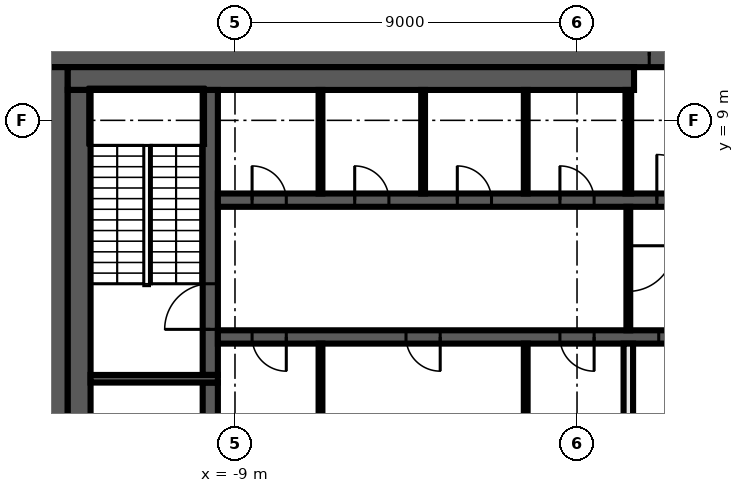
"""IFC4 building model, lengths in metres.
Left out: names, types, materials, properties, quantities, classifications, styles, units other than length and angle.
Written with IfcOpenShell. Run it as: python <this file> out.ifc"""

import sys

from ifc_helpers import new_model, si_unit, direction, frame, frame_2d, origin, place, context, subcontext, project, spatial, rectangle, extrude, element, fill, save


model = new_model("IFC4")
c1 = context("Model", 3, precision=1e-05, world=origin(), true_north=direction((0.0, 1.0)))
c2 = subcontext(c1, "Body", "Model", "MODEL_VIEW")
j1 = project(units=[si_unit("LENGTHUNIT", "METRE"), si_unit("PLANEANGLEUNIT", "RADIAN")], contexts=[c1])
p1 = place(None, origin())
s1 = spatial("IfcSite", under=j1, at=p1, CompositionType="ELEMENT")
p2 = place(p1, origin())
s2 = spatial("IfcBuilding", under=s1, at=p2, CompositionType="ELEMENT")
p3 = place(p2, frame((0.0, 0.0, 289.2)))
s3 = spatial("IfcBuildingStorey", under=s2, at=p3, CompositionType="ELEMENT", Elevation=289.2)
p4 = place(p3, frame((-14.0, 10.7, 0.0), z_axis=(0.0, 0.0, 1.0), x_axis=(1.0, 0.0, 0.0)))
e1 = element("IfcWall", 1, at=p4, inside=s3, PredefinedType="SHEAR", context=c2, shape_type="SweptSolid", body=[
    extrude(rectangle(XDim=28.0, YDim=0.6, at=frame_2d((14.0, 0.0))), origin(), (0.0, 0.0, 1.0), 4.62),
])
p5 = place(p4, frame((15.9, 0.0, 0.0)))
e2 = element("IfcOpeningElement", 2, at=p5, cuts=e1, PredefinedType="OPENING", context=c2, shape_type="SweptSolid", body=[
    extrude(rectangle(XDim=1.6, YDim=2.1, at=frame_2d((0.8, 1.05))), frame((0.0, 0.31, 0.0), z_axis=(0.0, -1.0, 0.0), x_axis=(1.0, 0.0, 0.0)), (0.0, 0.0, 1.0), 0.62),
])
p6 = place(p3, frame((-13.7, -10.4, 0.0), z_axis=(0.0, 0.0, 1.0), x_axis=(0.0, 1.0, 0.0)))
e3 = element("IfcWall", 3, at=p6, inside=s3, PredefinedType="SHEAR", context=c2, shape_type="SweptSolid", body=[
    extrude(rectangle(XDim=20.8, YDim=0.6, at=frame_2d((10.4, 0.0))), origin(), (0.0, 0.0, 1.0), 4.62),
])
p7 = place(p3, frame((-13.4, 10.1, 0.0), z_axis=(0.0, 0.0, 1.0), x_axis=(1.0, 0.0, 0.0)))
e4 = element("IfcWall", 4, at=p7, inside=s3, PredefinedType="SHEAR", context=c2, shape_type="SweptSolid", body=[
    extrude(rectangle(XDim=14.9, YDim=0.6, at=frame_2d((7.45, 0.0))), origin(), (0.0, 0.0, 1.0), 4.62),
])
p8 = place(p3, frame((-13.1, -9.8, 0.0), z_axis=(0.0, 0.0, 1.0), x_axis=(0.0, 1.0, 0.0)))
e5 = element("IfcWall", 5, at=p8, inside=s3, PredefinedType="SHEAR", context=c2, shape_type="SweptSolid", body=[
    extrude(rectangle(XDim=19.6, YDim=0.6, at=frame_2d((9.8, 0.0))), origin(), (0.0, 0.0, 1.0), 4.62),
])
p9 = place(p3, frame((-9.65, -2.1, 0.0), z_axis=(0.0, 0.0, 1.0), x_axis=(0.0, 1.0, 0.0)))
e6 = element("IfcWall", 6, at=p9, inside=s3, PredefinedType="SHEAR", context=c2, shape_type="SweptSolid", body=[
    extrude(rectangle(XDim=4.2, YDim=0.4, at=frame_2d((2.1, 0.0))), origin(), (0.0, 0.0, 1.0), 4.62),
])
p10 = place(p3, frame((-9.65, 2.3, 0.0), z_axis=(0.0, 0.0, 1.0), x_axis=(0.0, 1.0, 0.0)))
e7 = element("IfcWall", 7, at=p10, inside=s3, PredefinedType="SHEAR", context=c2, shape_type="SweptSolid", body=[
    extrude(rectangle(XDim=7.5, YDim=0.4, at=frame_2d((3.75, 0.0))), origin(), (0.0, 0.0, 1.0), 4.62),
])
p11 = place(p10, frame((1.2, 0.0, 0.0)))
e8 = element("IfcOpeningElement", 8, at=p11, cuts=e7, PredefinedType="OPENING", context=c2, shape_type="SweptSolid", body=[
    extrude(rectangle(XDim=1.2, YDim=2.1, at=frame_2d((0.6, 1.05))), frame((0.0, 0.21, 0.0), z_axis=(0.0, -1.0, 0.0), x_axis=(1.0, 0.0, 0.0)), (0.0, 0.0, 1.0), 0.42),
])
p12 = place(p3, frame((-9.45, 2.2, 0.0), z_axis=(0.0, 0.0, 1.0), x_axis=(-1.0, 0.0, 0.0)))
e9 = element("IfcWall", 9, at=p12, inside=s3, PredefinedType="SHEAR", context=c2, shape_type="SweptSolid", body=[
    extrude(rectangle(XDim=3.35, YDim=0.2, at=frame_2d((1.675, 0.0))), origin(), (0.0, 0.0, 1.0), 4.62),
])
p13 = place(p3, frame((-9.45, 6.9, 0.0), z_axis=(0.0, 0.0, 1.0), x_axis=(1.0, 0.0, 0.0)))
e10 = element("IfcWall", 10, at=p13, inside=s3, PredefinedType="SHEAR", context=c2, shape_type="SweptSolid", body=[
    extrude(rectangle(XDim=18.9, YDim=0.35, at=frame_2d((9.45, 0.0))), origin(), (0.0, 0.0, 1.0), 4.62),
])
p14 = place(p13, frame((11.55, 0.0, 0.0)))
e11 = element("IfcOpeningElement", 11, at=p14, cuts=e10, PredefinedType="OPENING", context=c2, shape_type="SweptSolid", body=[
    extrude(rectangle(XDim=1.2, YDim=2.1, at=frame_2d((0.6, 1.05))), frame((0.0, 0.185, 0.0), z_axis=(0.0, -1.0, 0.0), x_axis=(1.0, 0.0, 0.0)), (0.0, 0.0, 1.0), 0.37),
])
p15 = place(p13, frame((14.3, 0.0, 0.0)))
e12 = element("IfcOpeningElement", 12, at=p15, cuts=e10, PredefinedType="OPENING", context=c2, shape_type="SweptSolid", body=[
    extrude(rectangle(XDim=1.1, YDim=2.1, at=frame_2d((0.55, 1.05))), frame((0.0, 0.185, 0.0), z_axis=(0.0, -1.0, 0.0), x_axis=(1.0, 0.0, 0.0)), (0.0, 0.0, 1.0), 0.37),
])
p16 = place(p13, frame((17.0, 0.0, 0.0)))
e13 = element("IfcOpeningElement", 13, at=p16, cuts=e10, PredefinedType="OPENING", context=c2, shape_type="SweptSolid", body=[
    extrude(rectangle(XDim=1.1, YDim=2.1, at=frame_2d((0.55, 1.05))), frame((0.0, 0.185, 0.0), z_axis=(0.0, -1.0, 0.0), x_axis=(1.0, 0.0, 0.0)), (0.0, 0.0, 1.0), 0.37),
])
p17 = place(p13, frame((0.9, 0.0, 0.0)))
e14 = element("IfcOpeningElement", 14, at=p17, cuts=e10, PredefinedType="OPENING", context=c2, shape_type="SweptSolid", body=[
    extrude(rectangle(XDim=0.9, YDim=2.1, at=frame_2d((0.45, 1.05))), frame((0.0, 0.185, 0.0), z_axis=(0.0, -1.0, 0.0), x_axis=(1.0, 0.0, 0.0)), (0.0, 0.0, 1.0), 0.37),
])
p18 = place(p13, frame((3.6, 0.0, 0.0)))
e15 = element("IfcOpeningElement", 15, at=p18, cuts=e10, PredefinedType="OPENING", context=c2, shape_type="SweptSolid", body=[
    extrude(rectangle(XDim=0.9, YDim=2.1, at=frame_2d((0.45, 1.05))), frame((0.0, 0.185, 0.0), z_axis=(0.0, -1.0, 0.0), x_axis=(1.0, 0.0, 0.0)), (0.0, 0.0, 1.0), 0.37),
])
p19 = place(p13, frame((6.3, 0.0, 0.0)))
e16 = element("IfcOpeningElement", 16, at=p19, cuts=e10, PredefinedType="OPENING", context=c2, shape_type="SweptSolid", body=[
    extrude(rectangle(XDim=0.9, YDim=2.1, at=frame_2d((0.45, 1.05))), frame((0.0, 0.185, 0.0), z_axis=(0.0, -1.0, 0.0), x_axis=(1.0, 0.0, 0.0)), (0.0, 0.0, 1.0), 0.37),
])
p20 = place(p13, frame((9.0, 0.0, 0.0)))
e17 = element("IfcOpeningElement", 17, at=p20, cuts=e10, PredefinedType="OPENING", context=c2, shape_type="SweptSolid", body=[
    extrude(rectangle(XDim=0.9, YDim=2.1, at=frame_2d((0.45, 1.05))), frame((0.0, 0.185, 0.0), z_axis=(0.0, -1.0, 0.0), x_axis=(1.0, 0.0, 0.0)), (0.0, 0.0, 1.0), 0.37),
])
p21 = place(p3, frame((9.45, 3.3, 0.0), z_axis=(0.0, 0.0, 1.0), x_axis=(-1.0, 0.0, 0.0)))
e18 = element("IfcWall", 18, at=p21, inside=s3, PredefinedType="SHEAR", context=c2, shape_type="SweptSolid", body=[
    extrude(rectangle(XDim=18.9, YDim=0.35, at=frame_2d((9.45, 0.0))), origin(), (0.0, 0.0, 1.0), 4.62),
])
p22 = place(p21, frame((6.2, 0.0, 0.0)))
e19 = element("IfcOpeningElement", 19, at=p22, cuts=e18, PredefinedType="OPENING", context=c2, shape_type="SweptSolid", body=[
    extrude(rectangle(XDim=1.1, YDim=2.1, at=frame_2d((0.55, 1.05))), frame((0.0, 0.185, 0.0), z_axis=(0.0, -1.0, 0.0), x_axis=(1.0, 0.0, 0.0)), (0.0, 0.0, 1.0), 0.37),
])
p23 = place(p21, frame((3.5, 0.0, 0.0)))
e20 = element("IfcOpeningElement", 20, at=p23, cuts=e18, PredefinedType="OPENING", context=c2, shape_type="SweptSolid", body=[
    extrude(rectangle(XDim=1.1, YDim=2.1, at=frame_2d((0.55, 1.05))), frame((0.0, 0.185, 0.0), z_axis=(0.0, -1.0, 0.0), x_axis=(1.0, 0.0, 0.0)), (0.0, 0.0, 1.0), 0.37),
])
p24 = place(p21, frame((0.9, 0.0, 0.0)))
e21 = element("IfcOpeningElement", 21, at=p24, cuts=e18, PredefinedType="OPENING", context=c2, shape_type="SweptSolid", body=[
    extrude(rectangle(XDim=0.9, YDim=2.1, at=frame_2d((0.45, 1.05))), frame((0.0, 0.185, 0.0), z_axis=(0.0, -1.0, 0.0), x_axis=(1.0, 0.0, 0.0)), (0.0, 0.0, 1.0), 0.37),
])
p25 = place(p21, frame((17.1, 0.0, 0.0)))
e22 = element("IfcOpeningElement", 22, at=p25, cuts=e18, PredefinedType="OPENING", context=c2, shape_type="SweptSolid", body=[
    extrude(rectangle(XDim=0.9, YDim=2.1, at=frame_2d((0.45, 1.05))), frame((0.0, 0.185, 0.0), z_axis=(0.0, -1.0, 0.0), x_axis=(1.0, 0.0, 0.0)), (0.0, 0.0, 1.0), 0.37),
])
p26 = place(p21, frame((13.05, 0.0, 0.0)))
e23 = element("IfcOpeningElement", 23, at=p26, cuts=e18, PredefinedType="OPENING", context=c2, shape_type="SweptSolid", body=[
    extrude(rectangle(XDim=0.9, YDim=2.1, at=frame_2d((0.45, 1.05))), frame((0.0, 0.185, 0.0), z_axis=(0.0, -1.0, 0.0), x_axis=(1.0, 0.0, 0.0)), (0.0, 0.0, 1.0), 0.37),
])
p27 = place(p21, frame((9.0, 0.0, 0.0)))
e24 = element("IfcOpeningElement", 24, at=p27, cuts=e18, PredefinedType="OPENING", context=c2, shape_type="SweptSolid", body=[
    extrude(rectangle(XDim=0.9, YDim=2.1, at=frame_2d((0.45, 1.05))), frame((0.0, 0.185, 0.0), z_axis=(0.0, -1.0, 0.0), x_axis=(1.0, 0.0, 0.0)), (0.0, 0.0, 1.0), 0.37),
])
p28 = place(p3, frame((1.35, 7.075, 0.0), z_axis=(0.0, 0.0, 1.0), x_axis=(0.0, 1.0, 0.0)))
e25 = element("IfcWall", 25, at=p28, inside=s3, PredefinedType="PARTITIONING", context=c2, shape_type="SweptSolid", body=[
    extrude(rectangle(XDim=2.725, YDim=0.15, at=frame_2d((1.363, 0.0))), origin(), (0.0, 0.0, 1.0), 4.62),
])
p29 = place(p3, frame((1.35, 6.725, 0.0), z_axis=(0.0, 0.0, 1.0), x_axis=(0.0, -1.0, 0.0)))
e26 = element("IfcWall", 26, at=p29, inside=s3, PredefinedType="PARTITIONING", context=c2, shape_type="SweptSolid", body=[
    extrude(rectangle(XDim=3.25, YDim=0.1, at=frame_2d((1.625, 0.0))), origin(), (0.0, 0.0, 1.0), 4.62),
])
p30 = place(p29, frame((1.025, 0.0, 0.0)))
e27 = element("IfcOpeningElement", 27, at=p30, cuts=e26, PredefinedType="OPENING", context=c2, shape_type="SweptSolid", body=[
    extrude(rectangle(XDim=1.2, YDim=2.1, at=frame_2d((0.6, 1.05))), frame((0.0, 0.06, 0.0), z_axis=(0.0, -1.0, 0.0), x_axis=(1.0, 0.0, 0.0)), (0.0, 0.0, 1.0), 0.12),
])
p31 = place(p3, frame((1.35, 0.4, 0.0), z_axis=(0.0, 0.0, 1.0), x_axis=(0.0, 1.0, 0.0)))
e28 = element("IfcWall", 28, at=p31, inside=s3, PredefinedType="SOLIDWALL", context=c2, shape_type="SweptSolid", body=[
    extrude(rectangle(XDim=2.725, YDim=0.25, at=frame_2d((1.363, 0.0))), origin(), (0.0, 0.0, 1.0), 4.62),
])
for number, where, z_axis, x_axis in (
    (29, (-1.35, 0.4, 0.0), (0.0, 0.0, 1.0), (0.0, 1.0, 0.0)),
    (30, (-1.35, 7.075, 0.0), (0.0, 0.0, 1.0), (0.0, 1.0, 0.0)),
    (31, (-4.05, 7.075, 0.0), (0.0, 0.0, 1.0), (0.0, 1.0, 0.0)),
    (32, (-6.75, 0.4, 0.0), (0.0, 0.0, 1.0), (0.0, 1.0, 0.0)),
    (33, (-6.75, 7.075, 0.0), (0.0, 0.0, 1.0), (0.0, 1.0, 0.0)),
):
    element("IfcWall", number, at=place(p3, frame(where, z_axis=z_axis, x_axis=x_axis)), inside=s3, PredefinedType="PARTITIONING", context=c2, shape_type="SweptSolid", body=[
        extrude(rectangle(XDim=2.725, YDim=0.1, at=frame_2d((1.363, 0.0))), origin(), (0.0, 0.0, 1.0), 4.62),
    ])
p32 = place(p5, origin())
e34 = element("IfcDoor", 34, at=p32, inside=s3, OperationType="DOUBLE_DOOR_SINGLE_SWING", PredefinedType="DOOR", context=c2, shape_type="SweptSolid", body=[
    extrude(rectangle(XDim=1.6, YDim=2.1, at=frame_2d((0.8, 1.05))), frame((0.0, 0.025, 0.0), z_axis=(0.0, -1.0, 0.0), x_axis=(1.0, 0.0, 0.0)), (0.0, 0.0, 1.0), 0.05),
])
fill(e2, e34)
p33 = place(p14, origin())
e35 = element("IfcDoor", 35, at=p33, inside=s3, OperationType="SINGLE_SWING_LEFT", PredefinedType="DOOR", context=c2, shape_type="SweptSolid", body=[
    extrude(rectangle(XDim=1.2, YDim=2.1, at=frame_2d((0.6, 1.05))), frame((0.0, 0.025, 0.0), z_axis=(0.0, -1.0, 0.0), x_axis=(1.0, 0.0, 0.0)), (0.0, 0.0, 1.0), 0.05),
])
fill(e11, e35)
p34 = place(p22, origin())
e36 = element("IfcDoor", 36, at=p34, inside=s3, OperationType="DOUBLE_DOOR_SLIDING", PredefinedType="DOOR", context=c2, shape_type="SweptSolid", body=[
    extrude(rectangle(XDim=1.1, YDim=2.1, at=frame_2d((0.55, 1.05))), frame((0.0, 0.025, 0.0), z_axis=(0.0, -1.0, 0.0), x_axis=(1.0, 0.0, 0.0)), (0.0, 0.0, 1.0), 0.05),
])
fill(e19, e36)
p35 = place(p17, origin())
e37 = element("IfcDoor", 37, at=p35, inside=s3, OperationType="SINGLE_SWING_RIGHT", PredefinedType="DOOR", context=c2, shape_type="SweptSolid", body=[
    extrude(rectangle(XDim=0.9, YDim=2.1, at=frame_2d((0.45, 1.05))), frame((0.0, 0.025, 0.0), z_axis=(0.0, -1.0, 0.0), x_axis=(1.0, 0.0, 0.0)), (0.0, 0.0, 1.0), 0.05),
])
fill(e14, e37)
p36 = place(p18, origin())
e38 = element("IfcDoor", 38, at=p36, inside=s3, OperationType="SINGLE_SWING_LEFT", PredefinedType="DOOR", context=c2, shape_type="SweptSolid", body=[
    extrude(rectangle(XDim=0.9, YDim=2.1, at=frame_2d((0.45, 1.05))), frame((0.0, 0.025, 0.0), z_axis=(0.0, -1.0, 0.0), x_axis=(1.0, 0.0, 0.0)), (0.0, 0.0, 1.0), 0.05),
])
fill(e15, e38)
p37 = place(p19, origin())
e39 = element("IfcDoor", 39, at=p37, inside=s3, OperationType="SINGLE_SWING_RIGHT", PredefinedType="DOOR", context=c2, shape_type="SweptSolid", body=[
    extrude(rectangle(XDim=0.9, YDim=2.1, at=frame_2d((0.45, 1.05))), frame((0.0, 0.025, 0.0), z_axis=(0.0, -1.0, 0.0), x_axis=(1.0, 0.0, 0.0)), (0.0, 0.0, 1.0), 0.05),
])
fill(e16, e39)
p38 = place(p20, origin())
e40 = element("IfcDoor", 40, at=p38, inside=s3, OperationType="SINGLE_SWING_LEFT", PredefinedType="DOOR", context=c2, shape_type="SweptSolid", body=[
    extrude(rectangle(XDim=0.9, YDim=2.1, at=frame_2d((0.45, 1.05))), frame((0.0, 0.025, 0.0), z_axis=(0.0, -1.0, 0.0), x_axis=(1.0, 0.0, 0.0)), (0.0, 0.0, 1.0), 0.05),
])
fill(e17, e40)
p39 = place(p25, origin())
e41 = element("IfcDoor", 41, at=p39, inside=s3, OperationType="SINGLE_SWING_RIGHT", PredefinedType="DOOR", context=c2, shape_type="SweptSolid", body=[
    extrude(rectangle(XDim=0.9, YDim=2.1, at=frame_2d((0.45, 1.05))), frame((0.0, 0.025, 0.0), z_axis=(0.0, -1.0, 0.0), x_axis=(1.0, 0.0, 0.0)), (0.0, 0.0, 1.0), 0.05),
])
fill(e22, e41)
p40 = place(p26, origin())
e42 = element("IfcDoor", 42, at=p40, inside=s3, OperationType="SINGLE_SWING_LEFT", PredefinedType="DOOR", context=c2, shape_type="SweptSolid", body=[
    extrude(rectangle(XDim=0.9, YDim=2.1, at=frame_2d((0.45, 1.05))), frame((0.0, 0.025, 0.0), z_axis=(0.0, -1.0, 0.0), x_axis=(1.0, 0.0, 0.0)), (0.0, 0.0, 1.0), 0.05),
])
fill(e23, e42)
p41 = place(p27, origin())
e43 = element("IfcDoor", 43, at=p41, inside=s3, OperationType="SINGLE_SWING_RIGHT", PredefinedType="DOOR", context=c2, shape_type="SweptSolid", body=[
    extrude(rectangle(XDim=0.9, YDim=2.1, at=frame_2d((0.45, 1.05))), frame((0.0, 0.025, 0.0), z_axis=(0.0, -1.0, 0.0), x_axis=(1.0, 0.0, 0.0)), (0.0, 0.0, 1.0), 0.05),
])
fill(e24, e43)
p42 = place(p11, origin())
e44 = element("IfcDoor", 44, at=p42, inside=s3, OperationType="SINGLE_SWING_RIGHT", PredefinedType="DOOR", context=c2, shape_type="SweptSolid", body=[
    extrude(rectangle(XDim=1.2, YDim=2.1, at=frame_2d((0.6, 1.05))), frame((0.0, 0.025, 0.0), z_axis=(0.0, -1.0, 0.0), x_axis=(1.0, 0.0, 0.0)), (0.0, 0.0, 1.0), 0.05),
])
fill(e8, e44)
p43 = place(p30, origin())
e45 = element("IfcDoor", 45, at=p43, inside=s3, OperationType="SINGLE_SWING_LEFT", PredefinedType="DOOR", context=c2, shape_type="SweptSolid", body=[
    extrude(rectangle(XDim=1.2, YDim=2.1, at=frame_2d((0.6, 1.05))), frame((0.0, 0.025, 0.0), z_axis=(0.0, -1.0, 0.0), x_axis=(1.0, 0.0, 0.0)), (0.0, 0.0, 1.0), 0.05),
])
fill(e27, e45)
save(model, sys.argv[1])
